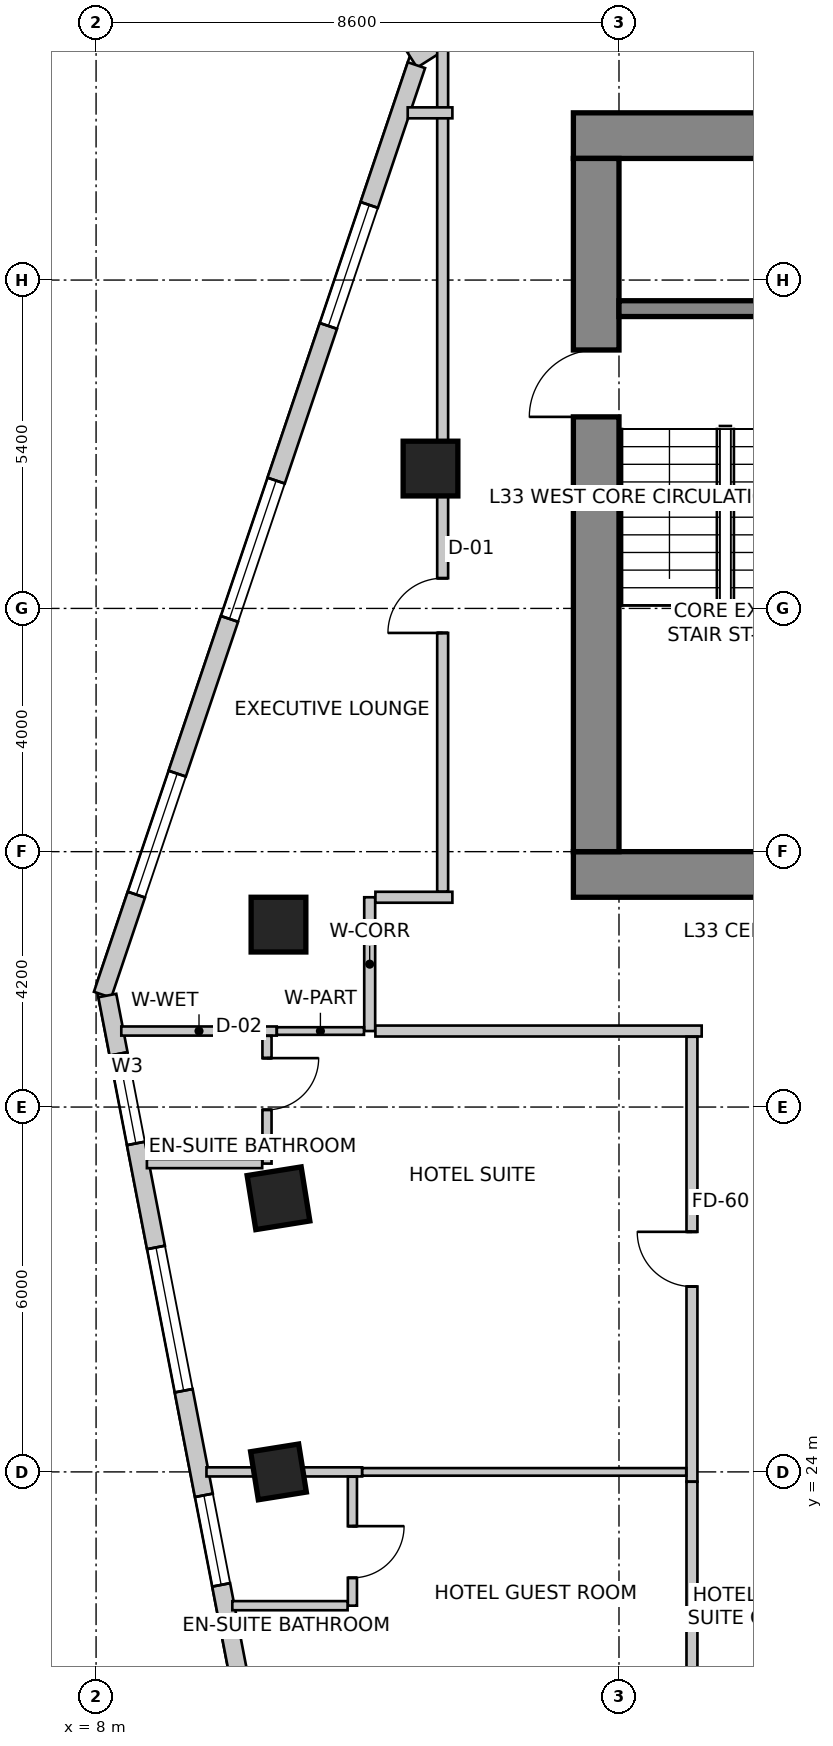
"""IFC4 building model, lengths in metres.
Left out: names, types, materials, properties, quantities, classifications, styles, units other than length and angle.
Written with IfcOpenShell. Run it as: python <this file> out.ifc"""

import sys

from ifc_helpers import new_model, si_unit, direction, frame, frame_2d, origin, origin_2d, place, context, subcontext, project, spatial, rectangle, extrude, source, transform, mapped, element, fill, save


model = new_model("IFC4")
c1 = context("Model", 3, precision=1e-05, world=origin(), true_north=direction((0.0, 1.0)))
c2 = subcontext(c1, "Body", "Model", "MODEL_VIEW")
j1 = project(units=[si_unit("LENGTHUNIT", "METRE"), si_unit("PLANEANGLEUNIT", "RADIAN")], contexts=[c1])
p1 = place(None, origin())
s1 = spatial("IfcSite", under=j1, at=p1, CompositionType="ELEMENT")
p2 = place(p1, origin())
s2 = spatial("IfcBuilding", under=s1, at=p2, CompositionType="ELEMENT")
p3 = place(p2, frame((0.0, 0.0, 135.8)))
s3 = spatial("IfcBuildingStorey", under=s2, at=p3, CompositionType="ELEMENT", Elevation=135.8)
p4 = place(p3, frame((15.85, 45.975, 0.0), z_axis=(0.0, 0.0, 1.0), x_axis=(1.0, 0.0, 0.0)))
e1 = element("IfcWall", 1, at=p4, inside=s3, PredefinedType="SHEAR", context=c2, shape_type="SweptSolid", body=[
    extrude(rectangle(XDim=15.9, YDim=0.75, at=frame_2d((7.95, 0.0))), origin(), (0.0, 0.0, 1.0), 3.6),
])
p5 = place(p3, frame((15.85, 33.825, 0.0), z_axis=(0.0, 0.0, 1.0), x_axis=(1.0, 0.0, 0.0)))
e2 = element("IfcWall", 2, at=p5, inside=s3, PredefinedType="SHEAR", context=c2, shape_type="SweptSolid", body=[
    extrude(rectangle(XDim=15.9, YDim=0.75, at=frame_2d((7.95, 0.0))), origin(), (0.0, 0.0, 1.0), 3.6),
])
m1 = source(origin(), c2, "Body", "SweptSolid", [
    extrude(rectangle(XDim=1.3, YDim=2.15, at=frame_2d((0.65, 1.075))), frame((0.0, 0.385, 0.0), z_axis=(0.0, -1.0, 0.0), x_axis=(1.0, 0.0, 0.0)), (0.0, 0.0, 1.0), 0.77),
])
p6 = place(p5, frame((10.08, 0.0, 0.0)))
e3 = element("IfcOpeningElement", 3, at=p6, cuts=e2, PredefinedType="OPENING", context=c2, shape_type="MappedRepresentation", body=[
    mapped(m1, transform((0.0, 0.0, 0.0), scale=1.0)),
])
p7 = place(p3, frame((16.225, 34.2, 0.0), z_axis=(0.0, 0.0, 1.0), x_axis=(0.0, 1.0, 0.0)))
e4 = element("IfcWall", 4, at=p7, inside=s3, PredefinedType="SHEAR", context=c2, shape_type="SweptSolid", body=[
    extrude(rectangle(XDim=11.4, YDim=0.75, at=frame_2d((5.7, 0.0))), origin(), (0.0, 0.0, 1.0), 3.6),
])
m2 = source(origin(), c2, "Body", "SweptSolid", [
    extrude(rectangle(XDim=1.1, YDim=2.15, at=frame_2d((0.55, 1.075))), frame((0.0, 0.385, 0.0), z_axis=(0.0, -1.0, 0.0), x_axis=(1.0, 0.0, 0.0)), (0.0, 0.0, 1.0), 0.77),
])
p8 = place(p7, frame((7.15, 0.0, 0.0)))
e5 = element("IfcOpeningElement", 5, at=p8, cuts=e4, PredefinedType="OPENING", context=c2, shape_type="MappedRepresentation", body=[
    mapped(m2, transform((0.0, 0.0, 0.0), scale=1.0)),
])
p9 = place(p3, frame((16.6, 43.13, 0.0), z_axis=(0.0, 0.0, 1.0), x_axis=(1.0, 0.0, 0.0)))
e6 = element("IfcWall", 6, at=p9, inside=s3, PredefinedType="SHEAR", context=c2, shape_type="SweptSolid", body=[
    extrude(rectangle(XDim=3.5, YDim=0.26, at=frame_2d((1.75, 0.0))), origin(), (0.0, 0.0, 1.0), 3.6),
])
m3 = source(origin(), c2, "Body", "SweptSolid", [
    extrude(rectangle(XDim=0.9, YDim=0.9, at=origin_2d()), origin(), (0.0, 0.0, 1.0), 3.6),
])
for number, where, z_axis, x_axis in (
    (7, (11.0, 33.0, 0.0), (0.0, 0.0, 1.0), (1.0, 0.0, 0.0)),
    (8, (13.5, 40.5, 0.0), (0.0, 0.0, 1.0), (1.0, 0.0, 0.0)),
    (9, (11.0, 28.5, 0.0), (0.0, 0.0, 1.0), (0.158, -0.987, 0.0)),
):
    element("IfcColumn", number, at=place(p3, frame(where, z_axis=z_axis, x_axis=x_axis)), inside=s3, PredefinedType="COLUMN", context=c2, shape_type="MappedRepresentation", body=[
        mapped(m3, transform((0.0, 0.0, 0.0), scale=1.0)),
    ])
m4 = source(origin(), c2, "Body", "SweptSolid", [
    extrude(rectangle(XDim=0.8, YDim=0.8, at=origin_2d()), origin(), (0.0, 0.0, 1.0), 3.6),
])
p10 = place(p3, frame((11.0, 24.0, 0.0), z_axis=(0.0, 0.0, 1.0), x_axis=(0.158158067254, -0.987413806751, 0.0)))
e10 = element("IfcColumn", 10, at=p10, inside=s3, PredefinedType="COLUMN", context=c2, shape_type="MappedRepresentation", body=[
    mapped(m4, transform((0.0, 0.0, 0.0), scale=1.0)),
])
p11 = place(p3, frame((21.875, 52.742, 0.0), z_axis=(0.0, 0.0, 1.0), x_axis=(-0.843662465249, -0.536873956092, 0.0)))
e11 = element("IfcWall", 11, at=p11, inside=s3, PredefinedType="SOLIDWALL", context=c2, shape_type="SweptSolid", body=[
    extrude(rectangle(XDim=10.284, YDim=0.3, at=frame_2d((5.142, 0.0))), origin(), (0.0, 0.0, 1.0), 3.3),
])
m5 = source(origin(), c2, "Body", "SweptSolid", [
    extrude(rectangle(XDim=2.4, YDim=2.2, at=frame_2d((1.2, 1.1))), frame((0.0, 0.16, 0.0), z_axis=(0.0, -1.0, 0.0), x_axis=(1.0, 0.0, 0.0)), (0.0, 0.0, 1.0), 0.32),
])
p12 = place(p11, frame((2.656, 0.0, 0.85)))
e12 = element("IfcOpeningElement", 12, at=p12, cuts=e11, PredefinedType="OPENING", context=c2, shape_type="MappedRepresentation", body=[
    mapped(m5, transform((0.0, 0.0, 0.0), scale=1.0)),
])
m6 = source(origin(), c2, "Body", "SweptSolid", [
    extrude(rectangle(XDim=1.5, YDim=1.8, at=frame_2d((0.75, 0.9))), frame((0.0, 0.16, 0.0), z_axis=(0.0, -1.0, 0.0), x_axis=(1.0, 0.0, 0.0)), (0.0, 0.0, 1.0), 0.32),
])
p13 = place(p11, frame((7.937, 0.0, 0.85)))
e13 = element("IfcOpeningElement", 13, at=p13, cuts=e11, PredefinedType="OPENING", context=c2, shape_type="MappedRepresentation", body=[
    mapped(m6, transform((0.0, 0.0, 0.0), scale=1.0)),
])
p14 = place(p3, frame((13.269, 47.134, 0.0), z_axis=(0.0, 0.0, 1.0), x_axis=(-0.319929596295, -0.947441319246, 0.0)))
e14 = element("IfcWall", 14, at=p14, inside=s3, PredefinedType="SOLIDWALL", context=c2, shape_type="SweptSolid", body=[
    extrude(rectangle(XDim=16.134, YDim=0.3, at=frame_2d((8.067, 0.0))), origin(), (0.0, 0.0, 1.0), 3.3),
])
m7 = source(origin(), c2, "Body", "SweptSolid", [
    extrude(rectangle(XDim=2.1, YDim=2.0, at=frame_2d((1.05, 1.0))), frame((0.0, 0.16, 0.0), z_axis=(0.0, -1.0, 0.0), x_axis=(1.0, 0.0, 0.0)), (0.0, 0.0, 1.0), 0.32),
])
p15 = place(p14, frame((2.426, 0.0, 0.85)))
e15 = element("IfcOpeningElement", 15, at=p15, cuts=e14, PredefinedType="OPENING", context=c2, shape_type="MappedRepresentation", body=[
    mapped(m7, transform((0.0, 0.0, 0.0), scale=1.0)),
])
p16 = place(p14, frame((7.211, 0.0, 0.85)))
e16 = element("IfcOpeningElement", 16, at=p16, cuts=e14, PredefinedType="OPENING", context=c2, shape_type="MappedRepresentation", body=[
    mapped(m5, transform((0.0, 0.0, 0.0), scale=1.0)),
])
p17 = place(p14, frame((12.297, 0.0, 0.85)))
e17 = element("IfcOpeningElement", 17, at=p17, cuts=e14, PredefinedType="OPENING", context=c2, shape_type="MappedRepresentation", body=[
    mapped(m7, transform((0.0, 0.0, 0.0), scale=1.0)),
])
p18 = place(p3, frame((8.185, 31.834, 0.0), z_axis=(0.0, 0.0, 1.0), x_axis=(0.189707113148, -0.981840725994, 0.0)))
e18 = element("IfcWall", 18, at=p18, inside=s3, PredefinedType="SOLIDWALL", context=c2, shape_type="SweptSolid", body=[
    extrude(rectangle(XDim=21.221, YDim=0.3, at=frame_2d((10.611, 0.0))), origin(), (0.0, 0.0, 1.0), 3.3),
])
p19 = place(p18, frame((0.977, 0.0, 0.85)))
e19 = element("IfcOpeningElement", 19, at=p19, cuts=e18, PredefinedType="OPENING", context=c2, shape_type="MappedRepresentation", body=[
    mapped(m6, transform((0.0, 0.0, 0.0), scale=1.0)),
])
p20 = place(p18, frame((4.219, 0.0, 0.85)))
e20 = element("IfcOpeningElement", 20, at=p20, cuts=e18, PredefinedType="OPENING", context=c2, shape_type="MappedRepresentation", body=[
    mapped(m5, transform((0.0, 0.0, 0.0), scale=1.0)),
])
p21 = place(p18, frame((8.371, 0.0, 0.85)))
e21 = element("IfcOpeningElement", 21, at=p21, cuts=e18, PredefinedType="OPENING", context=c2, shape_type="MappedRepresentation", body=[
    mapped(m6, transform((0.0, 0.0, 0.0), scale=1.0)),
])
p22 = place(p18, frame((12.504, 0.0, 0.85)))
e22 = element("IfcOpeningElement", 22, at=p22, cuts=e18, PredefinedType="OPENING", context=c2, shape_type="MappedRepresentation", body=[
    mapped(m5, transform((0.0, 0.0, 0.0), scale=1.0)),
])
p23 = place(p18, frame((17.944, 0.0, 0.85)))
e23 = element("IfcOpeningElement", 23, at=p23, cuts=e18, PredefinedType="OPENING", context=c2, shape_type="MappedRepresentation", body=[
    mapped(m5, transform((0.0, 0.0, 0.0), scale=1.0)),
])
p24 = place(p3, frame((12.5, 31.25, 0.0), z_axis=(0.0, 0.0, 1.0), x_axis=(0.0, 1.0, 0.0)))
e24 = element("IfcWall", 24, at=p24, inside=s3, PredefinedType="PARTITIONING", context=c2, shape_type="SweptSolid", body=[
    extrude(rectangle(XDim=2.2, YDim=0.18, at=frame_2d((1.1, 0.0))), origin(), (0.0, 0.0, 1.0), 2.885),
])
p25 = place(p3, frame((12.594, 33.45, 0.0), z_axis=(0.0, 0.0, 1.0), x_axis=(1.0, 0.0, 0.0)))
e25 = element("IfcWall", 25, at=p25, inside=s3, PredefinedType="PARTITIONING", context=c2, shape_type="SweptSolid", body=[
    extrude(rectangle(XDim=1.266, YDim=0.18, at=frame_2d((0.633, 0.0))), origin(), (0.0, 0.0, 1.0), 3.3),
])
p26 = place(p3, frame((17.96, 31.25, 0.0), z_axis=(0.0, 0.0, 1.0), x_axis=(-1.0, 0.0, 0.0)))
e26 = element("IfcWall", 26, at=p26, inside=s3, PredefinedType="PARTITIONING", context=c2, shape_type="SweptSolid", body=[
    extrude(rectangle(XDim=5.366, YDim=0.18, at=frame_2d((2.683, 0.0))), origin(), (0.0, 0.0, 1.0), 2.885),
])
p27 = place(p3, frame((13.7, 33.544, 0.0), z_axis=(0.0, 0.0, 1.0), x_axis=(0.0, 1.0, 0.0)))
e27 = element("IfcWall", 27, at=p27, inside=s3, PredefinedType="PARTITIONING", context=c2, shape_type="SweptSolid", body=[
    extrude(rectangle(XDim=13.86, YDim=0.18, at=frame_2d((6.93, 0.0))), origin(), (0.0, 0.0, 1.0), 2.442),
])
m8 = source(origin(), c2, "Body", "SweptSolid", [
    extrude(rectangle(XDim=0.9, YDim=2.15, at=frame_2d((0.45, 1.075))), frame((0.0, 0.1, 0.0), z_axis=(0.0, -1.0, 0.0), x_axis=(1.0, 0.0, 0.0)), (0.0, 0.0, 1.0), 0.2),
])
p28 = place(p27, frame((4.253, 0.0, 0.0)))
e28 = element("IfcOpeningElement", 28, at=p28, cuts=e27, PredefinedType="OPENING", context=c2, shape_type="MappedRepresentation", body=[
    mapped(m8, transform((0.0, 0.0, 0.0), scale=1.0)),
])
p29 = place(p3, frame((13.86, 46.35, 0.0), z_axis=(0.0, 0.0, 1.0), x_axis=(-1.0, 0.0, 0.0)))
e29 = element("IfcWall", 29, at=p29, inside=s3, PredefinedType="PARTITIONING", context=c2, shape_type="SweptSolid", body=[
    extrude(rectangle(XDim=0.735, YDim=0.18, at=frame_2d((0.367, 0.0))), origin(), (0.0, 0.0, 1.0), 3.3),
])
p30 = place(p3, frame((10.971, 31.25, 0.0), z_axis=(0.0, 0.0, 1.0), x_axis=(-1.0, 0.0, 0.0)))
e30 = element("IfcWall", 30, at=p30, inside=s3, PredefinedType="PARTITIONING", context=c2, shape_type="SweptSolid", body=[
    extrude(rectangle(XDim=2.556, YDim=0.15, at=frame_2d((1.278, 0.0))), origin(), (0.0, 0.0, 1.0), 2.442),
])
p31 = place(p3, frame((12.406, 31.25, 0.0), z_axis=(0.0, 0.0, 1.0), x_axis=(-1.0, 0.0, 0.0)))
e31 = element("IfcWall", 31, at=p31, inside=s3, PredefinedType="PARTITIONING", context=c2, shape_type="SweptSolid", body=[
    extrude(rectangle(XDim=1.433, YDim=0.125, at=frame_2d((0.717, 0.0))), origin(), (0.0, 0.0, 1.0), 2.442),
])
p32 = place(p3, frame((17.8, 23.84, 0.0), z_axis=(0.0, 0.0, 1.0), x_axis=(0.0, 1.0, 0.0)))
e32 = element("IfcWall", 32, at=p32, inside=s3, PredefinedType="PARTITIONING", context=c2, shape_type="SweptSolid", body=[
    extrude(rectangle(XDim=7.316, YDim=0.18, at=frame_2d((3.658, 0.0))), origin(), (0.0, 0.0, 1.0), 2.738),
])
p33 = place(p32, frame((3.208, 0.0, 0.0)))
e33 = element("IfcOpeningElement", 33, at=p33, cuts=e32, PredefinedType="OPENING", context=c2, shape_type="MappedRepresentation", body=[
    mapped(m8, transform((0.0, 0.0, 0.0), scale=1.0)),
])
p34 = place(p3, frame((17.8, 15.0, 0.0), z_axis=(0.0, 0.0, 1.0), x_axis=(0.0, 1.0, 0.0)))
e34 = element("IfcWall", 34, at=p34, inside=s3, PredefinedType="PARTITIONING", context=c2, shape_type="SweptSolid", body=[
    extrude(rectangle(XDim=8.838, YDim=0.18, at=frame_2d((4.419, 0.0))), origin(), (0.0, 0.0, 1.0), 2.442),
])
p35 = place(p34, frame((3.908, 0.0, 0.0)))
e35 = element("IfcOpeningElement", 35, at=p35, cuts=e34, PredefinedType="OPENING", context=c2, shape_type="MappedRepresentation", body=[
    mapped(m8, transform((0.0, 0.0, 0.0), scale=1.0)),
])
p36 = place(p3, frame((10.811, 31.171, 0.0), z_axis=(0.0, 0.0, 1.0), x_axis=(0.0, -1.0, 0.0)))
e36 = element("IfcWall", 36, at=p36, inside=s3, PredefinedType="PARTITIONING", context=c2, shape_type="SweptSolid", body=[
    extrude(rectangle(XDim=2.101, YDim=0.15, at=frame_2d((1.05, 0.0))), origin(), (0.0, 0.0, 1.0), 2.442),
])
m9 = source(origin(), c2, "Body", "SweptSolid", [
    extrude(rectangle(XDim=0.85, YDim=2.15, at=frame_2d((0.425, 1.075))), frame((0.0, 0.085, 0.0), z_axis=(0.0, -1.0, 0.0), x_axis=(1.0, 0.0, 0.0)), (0.0, 0.0, 1.0), 0.17),
])
p37 = place(p36, frame((0.366, 0.0, 0.0)))
e37 = element("IfcOpeningElement", 37, at=p37, cuts=e36, PredefinedType="OPENING", context=c2, shape_type="MappedRepresentation", body=[
    mapped(m9, transform((0.0, 0.0, 0.0), scale=1.0)),
])
p38 = place(p3, frame((10.732, 29.07, 0.0), z_axis=(0.0, 0.0, 1.0), x_axis=(-1.0, 0.0, 0.0)))
e38 = element("IfcWall", 38, at=p38, inside=s3, PredefinedType="PARTITIONING", context=c2, shape_type="SweptSolid", body=[
    extrude(rectangle(XDim=1.896, YDim=0.15, at=frame_2d((0.948, 0.0))), origin(), (0.0, 0.0, 1.0), 3.3),
])
p39 = place(p3, frame((12.375, 24.0, 0.0), z_axis=(0.0, 0.0, 1.0), x_axis=(-1.0, 0.0, 0.0)))
e39 = element("IfcWall", 39, at=p39, inside=s3, PredefinedType="PARTITIONING", context=c2, shape_type="SweptSolid", body=[
    extrude(rectangle(XDim=2.56, YDim=0.15, at=frame_2d((1.28, 0.0))), origin(), (0.0, 0.0, 1.0), 2.442),
])
p40 = place(p3, frame((17.706, 24.0, 0.0), z_axis=(0.0, 0.0, 1.0), x_axis=(-1.0, 0.0, 0.0)))
e40 = element("IfcWall", 40, at=p40, inside=s3, PredefinedType="PARTITIONING", context=c2, shape_type="SweptSolid", body=[
    extrude(rectangle(XDim=5.328, YDim=0.125, at=frame_2d((2.664, 0.0))), origin(), (0.0, 0.0, 1.0), 2.753),
])
p41 = place(p3, frame((12.216, 23.921, 0.0), z_axis=(0.0, 0.0, 1.0), x_axis=(0.0, -1.0, 0.0)))
e41 = element("IfcWall", 41, at=p41, inside=s3, PredefinedType="PARTITIONING", context=c2, shape_type="SweptSolid", body=[
    extrude(rectangle(XDim=2.121, YDim=0.15, at=frame_2d((1.061, 0.0))), origin(), (0.0, 0.0, 1.0), 2.738),
])
p42 = place(p41, frame((0.813, 0.0, 0.0)))
e42 = element("IfcOpeningElement", 42, at=p42, cuts=e41, PredefinedType="OPENING", context=c2, shape_type="MappedRepresentation", body=[
    mapped(m9, transform((0.0, 0.0, 0.0), scale=1.0)),
])
p43 = place(p3, frame((12.137, 21.8, 0.0), z_axis=(0.0, 0.0, 1.0), x_axis=(-1.0, 0.0, 0.0)))
e43 = element("IfcWall", 43, at=p43, inside=s3, PredefinedType="PARTITIONING", context=c2, shape_type="SweptSolid", body=[
    extrude(rectangle(XDim=1.896, YDim=0.15, at=frame_2d((0.948, 0.0))), origin(), (0.0, 0.0, 1.0), 3.3),
])
m10 = source(origin(), c2, "Body", "SweptSolid", [
    extrude(rectangle(XDim=2.1, YDim=2.0, at=frame_2d((1.05, 1.0))), frame((0.0, -0.015, 0.0), z_axis=(0.0, -1.0, 0.0), x_axis=(1.0, 0.0, 0.0)), (0.0, 0.0, 1.0), 0.06),
])
p44 = place(p15, origin())
e44 = element("IfcWindow", 44, at=p44, inside=s3, PartitioningType="SINGLE_PANEL", PredefinedType="WINDOW", context=c2, shape_type="MappedRepresentation", body=[
    mapped(m10, transform((0.0, 0.0, 0.0), scale=1.0)),
])
fill(e15, e44)
m11 = source(origin(), c2, "Body", "SweptSolid", [
    extrude(rectangle(XDim=2.4, YDim=2.2, at=frame_2d((1.2, 1.1))), frame((0.0, -0.015, 0.0), z_axis=(0.0, -1.0, 0.0), x_axis=(1.0, 0.0, 0.0)), (0.0, 0.0, 1.0), 0.06),
])
p45 = place(p16, origin())
e45 = element("IfcWindow", 45, at=p45, inside=s3, PartitioningType="SINGLE_PANEL", PredefinedType="WINDOW", context=c2, shape_type="MappedRepresentation", body=[
    mapped(m11, transform((0.0, 0.0, 0.0), scale=1.0)),
])
fill(e16, e45)
p46 = place(p17, origin())
e46 = element("IfcWindow", 46, at=p46, inside=s3, PartitioningType="SINGLE_PANEL", PredefinedType="WINDOW", context=c2, shape_type="MappedRepresentation", body=[
    mapped(m10, transform((0.0, 0.0, 0.0), scale=1.0)),
])
fill(e17, e46)
m12 = source(origin(), c2, "Body", "SweptSolid", [
    extrude(rectangle(XDim=1.5, YDim=1.8, at=frame_2d((0.75, 0.9))), frame((0.0, -0.015, 0.0), z_axis=(0.0, -1.0, 0.0), x_axis=(1.0, 0.0, 0.0)), (0.0, 0.0, 1.0), 0.06),
])
p47 = place(p19, origin())
e47 = element("IfcWindow", 47, at=p47, inside=s3, PartitioningType="SINGLE_PANEL", PredefinedType="WINDOW", context=c2, shape_type="MappedRepresentation", body=[
    mapped(m12, transform((0.0, 0.0, 0.0), scale=1.0)),
])
fill(e19, e47)
p48 = place(p20, origin())
e48 = element("IfcWindow", 48, at=p48, inside=s3, PartitioningType="SINGLE_PANEL", PredefinedType="WINDOW", context=c2, shape_type="MappedRepresentation", body=[
    mapped(m11, transform((0.0, 0.0, 0.0), scale=1.0)),
])
fill(e20, e48)
p49 = place(p21, origin())
e49 = element("IfcWindow", 49, at=p49, inside=s3, PartitioningType="SINGLE_PANEL", PredefinedType="WINDOW", context=c2, shape_type="MappedRepresentation", body=[
    mapped(m12, transform((0.0, 0.0, 0.0), scale=1.0)),
])
fill(e21, e49)
m13 = source(origin(), c2, "Body", "SweptSolid", [
    extrude(rectangle(XDim=1.1, YDim=2.15, at=frame_2d((0.55, 1.075))), frame((0.0, 0.025, 0.0), z_axis=(0.0, -1.0, 0.0), x_axis=(1.0, 0.0, 0.0)), (0.0, 0.0, 1.0), 0.05),
])
p50 = place(p8, origin())
e50 = element("IfcDoor", 50, at=p50, inside=s3, OperationType="SINGLE_SWING_LEFT", PredefinedType="DOOR", context=c2, shape_type="MappedRepresentation", body=[
    mapped(m13, transform((0.0, 0.0, 0.0), scale=1.0)),
])
fill(e5, e50)
m14 = source(origin(), c2, "Body", "SweptSolid", [
    extrude(rectangle(XDim=0.9, YDim=2.15, at=frame_2d((0.45, 1.075))), frame((0.0, 0.025, 0.0), z_axis=(0.0, -1.0, 0.0), x_axis=(1.0, 0.0, 0.0)), (0.0, 0.0, 1.0), 0.05),
])
p51 = place(p28, origin())
e51 = element("IfcDoor", 51, at=p51, inside=s3, OperationType="SINGLE_SWING_LEFT", PredefinedType="DOOR", context=c2, shape_type="MappedRepresentation", body=[
    mapped(m14, transform((0.0, 0.0, 0.0), scale=1.0)),
])
fill(e28, e51)
m15 = source(origin(), c2, "Body", "SweptSolid", [
    extrude(rectangle(XDim=0.85, YDim=2.15, at=frame_2d((0.425, 1.075))), frame((0.0, 0.025, 0.0), z_axis=(0.0, -1.0, 0.0), x_axis=(1.0, 0.0, 0.0)), (0.0, 0.0, 1.0), 0.05),
])
p52 = place(p37, origin())
e52 = element("IfcDoor", 52, at=p52, inside=s3, OperationType="SINGLE_SWING_LEFT", PredefinedType="DOOR", context=c2, shape_type="MappedRepresentation", body=[
    mapped(m15, transform((0.0, 0.0, 0.0), scale=1.0)),
])
fill(e37, e52)
m16 = source(origin(), c2, "Body", "SweptSolid", [
    extrude(rectangle(XDim=0.9, YDim=2.15, at=frame_2d((0.45, 1.075))), frame((0.0, 0.025, 0.0), z_axis=(0.0, -1.0, 0.0), x_axis=(1.0, 0.0, 0.0)), (0.0, 0.0, 1.0), 0.05),
])
p53 = place(p33, origin())
e53 = element("IfcDoor", 53, at=p53, inside=s3, OperationType="SINGLE_SWING_RIGHT", PredefinedType="DOOR", context=c2, shape_type="MappedRepresentation", body=[
    mapped(m16, transform((0.0, 0.0, 0.0), scale=1.0)),
])
fill(e33, e53)
p54 = place(p42, origin())
e54 = element("IfcDoor", 54, at=p54, inside=s3, OperationType="SINGLE_SWING_LEFT", PredefinedType="DOOR", context=c2, shape_type="MappedRepresentation", body=[
    mapped(m15, transform((0.0, 0.0, 0.0), scale=1.0)),
])
fill(e42, e54)
save(model, sys.argv[1])
